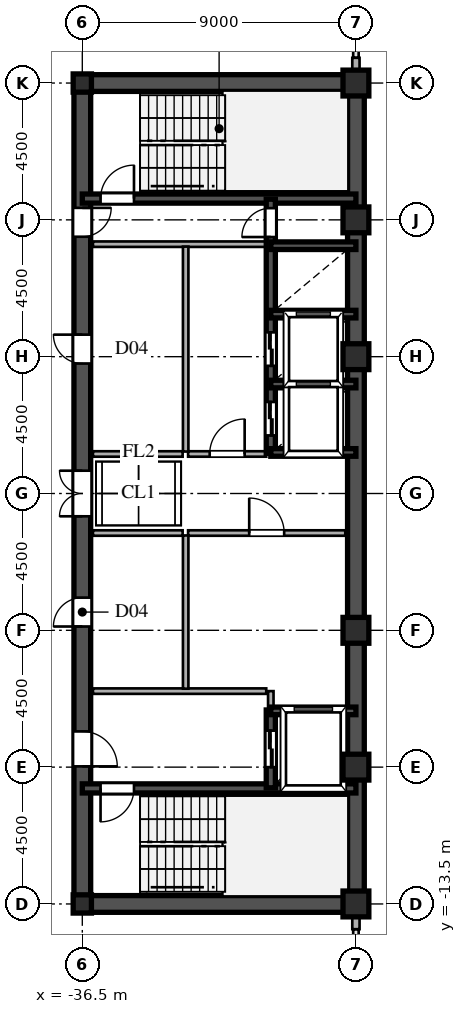
"""IFC4 building model, lengths in metres.
Left out: names, types, materials, properties, quantities, classifications, styles, units other than length and angle.
Written with IfcOpenShell. Run it as: python <this file> out.ifc"""

import sys

from ifc_helpers import new_model, si_unit, direction, frame, frame_2d, origin, origin_2d, place, context, subcontext, project, spatial, rectangle, hollow_rectangle, i_section, extrude, source, transform, mapped, element, fill, save


model = new_model("IFC4")
c1 = context("Model", 3, precision=1e-05, world=origin(), true_north=direction((0.0, 1.0)))
c2 = subcontext(c1, "Body", "Model", "MODEL_VIEW")
j1 = project(units=[si_unit("LENGTHUNIT", "METRE"), si_unit("PLANEANGLEUNIT", "RADIAN")], contexts=[c1])
p1 = place(None, origin())
s1 = spatial("IfcSite", under=j1, at=p1, CompositionType="ELEMENT")
p2 = place(p1, origin())
s2 = spatial("IfcBuilding", under=s1, at=p2, CompositionType="ELEMENT")
p3 = place(p2, frame((0.0, 0.0, 188.7)))
s3 = spatial("IfcBuildingStorey", under=s2, at=p3, CompositionType="ELEMENT", Elevation=188.7)
m1 = source(origin(), c2, "Body", "SweptSolid", [
    extrude(hollow_rectangle(XDim=0.85, YDim=0.85, WallThickness=0.036, at=origin_2d()), origin(), (0.0, 0.0, 1.0), 3.6),
])
for number, where, z_axis, x_axis in (
    (1, (-27.5, -13.5, 0.0), (0.0, 0.0, 1.0), (1.0, 0.0, 0.0)),
    (2, (-27.5, -9.0, 0.0), (0.0, 0.0, 1.0), (1.0, 0.0, 0.0)),
    (3, (-27.5, -4.5, 0.0), (0.0, 0.0, 1.0), (1.0, 0.0, 0.0)),
    (4, (-27.5, 4.5, 0.0), (0.0, 0.0, 1.0), (1.0, 0.0, 0.0)),
    (5, (-27.5, 9.0, 0.0), (0.0, 0.0, 1.0), (1.0, 0.0, 0.0)),
    (6, (-27.5, 13.5, 0.0), (0.0, 0.0, 1.0), (1.0, 0.0, 0.0)),
):
    element("IfcColumn", number, at=place(p3, frame(where, z_axis=z_axis, x_axis=x_axis)), inside=s3, PredefinedType="COLUMN", context=c2, shape_type="MappedRepresentation", body=[
        mapped(m1, transform((0.0, 0.0, 0.0), scale=1.0)),
    ])
m2 = source(origin(), c2, "Body", "SweptSolid", [
    extrude(i_section(OverallWidth=0.6, OverallDepth=0.6, WebThickness=0.025, FlangeThickness=0.04, at=origin_2d()), origin(), (0.0, 0.0, 1.0), 3.6),
])
for number, where, z_axis, x_axis in (
    (7, (-36.5, -13.5, 0.0), (0.0, 0.0, 1.0), (1.0, 0.0, 0.0)),
    (8, (-36.5, 13.5, 0.0), (0.0, 0.0, 1.0), (1.0, 0.0, 0.0)),
):
    element("IfcColumn", number, at=place(p3, frame(where, z_axis=z_axis, x_axis=x_axis)), inside=s3, PredefinedType="COLUMN", context=c2, shape_type="MappedRepresentation", body=[
        mapped(m2, transform((0.0, 0.0, 0.0), scale=1.0)),
    ])
for number, where, z_axis, x_axis in (
    (9, (-27.5, -14.33, 0.0), (0.0, 0.0, 1.0), (0.0, 1.0, 0.0)),
    (10, (-27.5, 13.78, 0.0), (0.0, 0.0, 1.0), (0.0, 1.0, 0.0)),
):
    element("IfcWall", number, at=place(p3, frame(where, z_axis=z_axis, x_axis=x_axis)), inside=s3, PredefinedType="SOLIDWALL", context=c2, shape_type="SweptSolid", body=[
        extrude(rectangle(XDim=0.55, YDim=0.24, at=frame_2d((0.275, 0.0))), origin(), (0.0, 0.0, 1.0), 2.88),
    ])
for number, where, z_axis, x_axis in (
    (11, (-27.5, -13.5, 0.0), (0.0, 0.0, 1.0), (0.0, 1.0, 0.0)),
    (12, (-27.5, 1.3, 0.0), (0.0, 0.0, 1.0), (0.0, 1.0, 0.0)),
):
    element("IfcWall", number, at=place(p3, frame(where, z_axis=z_axis, x_axis=x_axis)), inside=s3, PredefinedType="SHEAR", context=c2, shape_type="SweptSolid", body=[
        extrude(rectangle(XDim=12.2, YDim=0.55, at=frame_2d((6.1, 0.0))), origin(), (0.0, 0.0, 1.0), 3.38),
    ])
p4 = place(p3, frame((-27.5, -1.3, 0.0), z_axis=(0.0, 0.0, 1.0), x_axis=(0.0, 1.0, 0.0)))
e13 = element("IfcWall", 13, at=p4, inside=s3, PredefinedType="SHEAR", context=c2, shape_type="SweptSolid", body=[
    extrude(rectangle(XDim=2.6, YDim=0.55, at=frame_2d((1.3, 0.0))), origin(), (0.0, 0.0, 1.0), 3.38),
])
for number, where, z_axis, x_axis in (
    (14, (-36.5, -13.5, 0.0), (0.0, 0.0, 1.0), (1.0, 0.0, 0.0)),
    (15, (-36.5, 13.5, 0.0), (0.0, 0.0, 1.0), (1.0, 0.0, 0.0)),
):
    element("IfcWall", number, at=place(p3, frame(where, z_axis=z_axis, x_axis=x_axis)), inside=s3, PredefinedType="SHEAR", context=c2, shape_type="SweptSolid", body=[
        extrude(rectangle(XDim=9.0, YDim=0.55, at=frame_2d((4.5, 0.0))), origin(), (0.0, 0.0, 1.0), 3.38),
    ])
p5 = place(p3, frame((-36.5, -13.65, 0.0), z_axis=(0.0, 0.0, 1.0), x_axis=(0.0, 1.0, 0.0)))
e16 = element("IfcWall", 16, at=p5, inside=s3, PredefinedType="SHEAR", context=c2, shape_type="SweptSolid", body=[
    extrude(rectangle(XDim=7.15, YDim=0.55, at=frame_2d((3.575, 0.0))), origin(), (0.0, 0.0, 1.0), 3.38),
])
p6 = place(p5, frame((4.675, 0.0, 0.0)))
e17 = element("IfcOpeningElement", 17, at=p6, cuts=e16, PredefinedType="OPENING", context=c2, shape_type="SweptSolid", body=[
    extrude(rectangle(XDim=1.15, YDim=2.2, at=frame_2d((0.575, 1.1))), frame((0.0, 0.285, 0.0), z_axis=(0.0, -1.0, 0.0), x_axis=(1.0, 0.0, 0.0)), (0.0, 0.0, 1.0), 0.57),
])
p7 = place(p3, frame((-36.5, -1.3, 0.0), z_axis=(0.0, 0.0, 1.0), x_axis=(0.0, 1.0, 0.0)))
e18 = element("IfcWall", 18, at=p7, inside=s3, PredefinedType="SHEAR", context=c2, shape_type="SweptSolid", body=[
    extrude(rectangle(XDim=2.6, YDim=0.55, at=frame_2d((1.3, 0.0))), origin(), (0.0, 0.0, 1.0), 3.38),
])
p8 = place(p7, frame((0.55, 0.0, 0.0)))
e19 = element("IfcOpeningElement", 19, at=p8, cuts=e18, PredefinedType="OPENING", context=c2, shape_type="SweptSolid", body=[
    extrude(rectangle(XDim=1.5, YDim=2.3, at=frame_2d((0.75, 1.15))), frame((0.0, 0.285, 0.0), z_axis=(0.0, -1.0, 0.0), x_axis=(1.0, 0.0, 0.0)), (0.0, 0.0, 1.0), 0.57),
])
p9 = place(p3, frame((-36.5, 8.2, 0.0), z_axis=(0.0, 0.0, 1.0), x_axis=(0.0, 1.0, 0.0)))
e20 = element("IfcWall", 20, at=p9, inside=s3, PredefinedType="SHEAR", context=c2, shape_type="SweptSolid", body=[
    extrude(rectangle(XDim=5.45, YDim=0.55, at=frame_2d((2.725, 0.0))), origin(), (0.0, 0.0, 1.0), 3.38),
])
p10 = place(p9, frame((0.245, 0.0, 0.0)))
e21 = element("IfcOpeningElement", 21, at=p10, cuts=e20, PredefinedType="OPENING", context=c2, shape_type="SweptSolid", body=[
    extrude(rectangle(XDim=0.95, YDim=2.15, at=frame_2d((0.475, 1.075))), frame((0.0, 0.285, 0.0), z_axis=(0.0, -1.0, 0.0), x_axis=(1.0, 0.0, 0.0)), (0.0, 0.0, 1.0), 0.57),
])
p11 = place(p3, frame((-36.5, -6.5, 0.0), z_axis=(0.0, 0.0, 1.0), x_axis=(0.0, 1.0, 0.0)))
e22 = element("IfcWall", 22, at=p11, inside=s3, PredefinedType="SHEAR", context=c2, shape_type="SweptSolid", body=[
    extrude(rectangle(XDim=5.2, YDim=0.55, at=frame_2d((2.6, 0.0))), origin(), (0.0, 0.0, 1.0), 3.38),
])
p12 = place(p11, frame((2.125, 0.0, 0.0)))
e23 = element("IfcOpeningElement", 23, at=p12, cuts=e22, PredefinedType="OPENING", context=c2, shape_type="SweptSolid", body=[
    extrude(rectangle(XDim=0.95, YDim=2.15, at=frame_2d((0.475, 1.075))), frame((0.0, 0.285, 0.0), z_axis=(0.0, -1.0, 0.0), x_axis=(1.0, 0.0, 0.0)), (0.0, 0.0, 1.0), 0.57),
])
p13 = place(p3, frame((-36.5, 1.3, 0.0), z_axis=(0.0, 0.0, 1.0), x_axis=(0.0, 1.0, 0.0)))
e24 = element("IfcWall", 24, at=p13, inside=s3, PredefinedType="SHEAR", context=c2, shape_type="SweptSolid", body=[
    extrude(rectangle(XDim=6.9, YDim=0.55, at=frame_2d((3.45, 0.0))), origin(), (0.0, 0.0, 1.0), 3.38),
])
p14 = place(p13, frame((2.975, 0.0, 0.0)))
e25 = element("IfcOpeningElement", 25, at=p14, cuts=e24, PredefinedType="OPENING", context=c2, shape_type="SweptSolid", body=[
    extrude(rectangle(XDim=0.95, YDim=2.15, at=frame_2d((0.475, 1.075))), frame((0.0, 0.285, 0.0), z_axis=(0.0, -1.0, 0.0), x_axis=(1.0, 0.0, 0.0)), (0.0, 0.0, 1.0), 0.57),
])
p15 = place(p3, frame((-36.5, -9.7, 0.0), z_axis=(0.0, 0.0, 1.0), x_axis=(1.0, 0.0, 0.0)))
e26 = element("IfcWall", 26, at=p15, inside=s3, PredefinedType="SHEAR", context=c2, shape_type="SweptSolid", body=[
    extrude(rectangle(XDim=9.0, YDim=0.3, at=frame_2d((4.5, 0.0))), origin(), (0.0, 0.0, 1.0), 3.38),
])
p16 = place(p15, frame((0.6, 0.0, 0.0)))
e27 = element("IfcOpeningElement", 27, at=p16, cuts=e26, PredefinedType="OPENING", context=c2, shape_type="SweptSolid", body=[
    extrude(rectangle(XDim=1.1, YDim=2.2, at=frame_2d((0.55, 1.1))), frame((0.0, 0.16, 0.0), z_axis=(0.0, -1.0, 0.0), x_axis=(1.0, 0.0, 0.0)), (0.0, 0.0, 1.0), 0.32),
])
p17 = place(p3, frame((-36.5, 9.7, 0.0), z_axis=(0.0, 0.0, 1.0), x_axis=(1.0, 0.0, 0.0)))
e28 = element("IfcWall", 28, at=p17, inside=s3, PredefinedType="SHEAR", context=c2, shape_type="SweptSolid", body=[
    extrude(rectangle(XDim=9.0, YDim=0.3, at=frame_2d((4.5, 0.0))), origin(), (0.0, 0.0, 1.0), 3.38),
])
p18 = place(p17, frame((0.6, 0.0, 0.0)))
e29 = element("IfcOpeningElement", 29, at=p18, cuts=e28, PredefinedType="OPENING", context=c2, shape_type="SweptSolid", body=[
    extrude(rectangle(XDim=1.1, YDim=2.2, at=frame_2d((0.55, 1.1))), frame((0.0, 0.16, 0.0), z_axis=(0.0, -1.0, 0.0), x_axis=(1.0, 0.0, 0.0)), (0.0, 0.0, 1.0), 0.32),
])
for number, where, z_axis, x_axis in (
    (30, (-30.3, -7.15, 0.0), (0.0, 0.0, 1.0), (1.0, 0.0, 0.0)),
    (31, (-30.3, 1.35, 0.0), (0.0, 0.0, 1.0), (1.0, 0.0, 0.0)),
    (32, (-30.3, 3.6, 0.0), (0.0, 0.0, 1.0), (1.0, 0.0, 0.0)),
    (33, (-30.3, 5.9, 0.0), (0.0, 0.0, 1.0), (1.0, 0.0, 0.0)),
    (34, (-30.3, 8.15, 0.0), (0.0, 0.0, 1.0), (1.0, 0.0, 0.0)),
):
    element("IfcWall", number, at=place(p3, frame(where, z_axis=z_axis, x_axis=x_axis)), inside=s3, PredefinedType="SHEAR", context=c2, shape_type="SweptSolid", body=[
        extrude(rectangle(XDim=2.8, YDim=0.25, at=frame_2d((1.4, 0.0))), origin(), (0.0, 0.0, 1.0), 3.38),
    ])
p19 = place(p3, frame((-30.3, -9.68, 0.0), z_axis=(0.0, 0.0, 1.0), x_axis=(0.0, 1.0, 0.0)))
e35 = element("IfcWall", 35, at=p19, inside=s3, PredefinedType="SHEAR", context=c2, shape_type="SweptSolid", body=[
    extrude(rectangle(XDim=2.56, YDim=0.3, at=frame_2d((1.28, 0.0))), origin(), (0.0, 0.0, 1.0), 3.38),
])
p20 = place(p19, frame((0.68, 0.0, 0.0)))
e36 = element("IfcOpeningElement", 36, at=p20, cuts=e35, PredefinedType="OPENING", context=c2, shape_type="SweptSolid", body=[
    extrude(rectangle(XDim=1.2, YDim=2.25, at=frame_2d((0.6, 1.125))), frame((0.0, 0.16, 0.0), z_axis=(0.0, -1.0, 0.0), x_axis=(1.0, 0.0, 0.0)), (0.0, 0.0, 1.0), 0.32),
])
p21 = place(p3, frame((-30.3, 1.32, 0.0), z_axis=(0.0, 0.0, 1.0), x_axis=(0.0, 1.0, 0.0)))
e37 = element("IfcWall", 37, at=p21, inside=s3, PredefinedType="SHEAR", context=c2, shape_type="SweptSolid", body=[
    extrude(rectangle(XDim=2.28, YDim=0.3, at=frame_2d((1.14, 0.0))), origin(), (0.0, 0.0, 1.0), 3.38),
])
p22 = place(p21, frame((0.59, 0.0, 0.0)))
e38 = element("IfcOpeningElement", 38, at=p22, cuts=e37, PredefinedType="OPENING", context=c2, shape_type="SweptSolid", body=[
    extrude(rectangle(XDim=1.1, YDim=2.2, at=frame_2d((0.55, 1.1))), frame((0.0, 0.16, 0.0), z_axis=(0.0, -1.0, 0.0), x_axis=(1.0, 0.0, 0.0)), (0.0, 0.0, 1.0), 0.32),
])
p23 = place(p3, frame((-30.3, 3.6, 0.0), z_axis=(0.0, 0.0, 1.0), x_axis=(0.0, 1.0, 0.0)))
e39 = element("IfcWall", 39, at=p23, inside=s3, PredefinedType="SHEAR", context=c2, shape_type="SweptSolid", body=[
    extrude(rectangle(XDim=2.3, YDim=0.3, at=frame_2d((1.15, 0.0))), origin(), (0.0, 0.0, 1.0), 3.38),
])
p24 = place(p23, frame((0.6, 0.0, 0.0)))
e40 = element("IfcOpeningElement", 40, at=p24, cuts=e39, PredefinedType="OPENING", context=c2, shape_type="SweptSolid", body=[
    extrude(rectangle(XDim=1.1, YDim=2.2, at=frame_2d((0.55, 1.1))), frame((0.0, 0.16, 0.0), z_axis=(0.0, -1.0, 0.0), x_axis=(1.0, 0.0, 0.0)), (0.0, 0.0, 1.0), 0.32),
])
p25 = place(p3, frame((-30.3, 5.9, 0.0), z_axis=(0.0, 0.0, 1.0), x_axis=(0.0, 1.0, 0.0)))
e41 = element("IfcWall", 41, at=p25, inside=s3, PredefinedType="SHEAR", context=c2, shape_type="SweptSolid", body=[
    extrude(rectangle(XDim=2.25, YDim=0.3, at=frame_2d((1.125, 0.0))), origin(), (0.0, 0.0, 1.0), 3.38),
])
p26 = place(p3, frame((-30.3, 8.15, 0.0), z_axis=(0.0, 0.0, 1.0), x_axis=(0.0, 1.0, 0.0)))
e42 = element("IfcWall", 42, at=p26, inside=s3, PredefinedType="SHEAR", context=c2, shape_type="SweptSolid", body=[
    extrude(rectangle(XDim=1.53, YDim=0.3, at=frame_2d((0.765, 0.0))), origin(), (0.0, 0.0, 1.0), 3.38),
])
p27 = place(p26, frame((0.285, 0.0, 0.0)))
e43 = element("IfcOpeningElement", 43, at=p27, cuts=e42, PredefinedType="OPENING", context=c2, shape_type="SweptSolid", body=[
    extrude(rectangle(XDim=0.95, YDim=2.15, at=frame_2d((0.475, 1.075))), frame((0.0, 0.16, 0.0), z_axis=(0.0, -1.0, 0.0), x_axis=(1.0, 0.0, 0.0)), (0.0, 0.0, 1.0), 0.32),
])
p28 = place(p3, frame((-36.15, -6.5, 0.0), z_axis=(0.0, 0.0, 1.0), x_axis=(1.0, 0.0, 0.0)))
e44 = element("IfcWall", 44, at=p28, inside=s3, PredefinedType="PARTITIONING", context=c2, shape_type="SweptSolid", body=[
    extrude(rectangle(XDim=5.7, YDim=0.18, at=frame_2d((2.85, 0.0))), origin(), (0.0, 0.0, 1.0), 3.38),
])
p29 = place(p3, frame((-30.3, -7.12, 0.0), z_axis=(0.0, 0.0, 1.0), x_axis=(0.0, 1.0, 0.0)))
e45 = element("IfcWall", 45, at=p29, inside=s3, PredefinedType="PARTITIONING", context=c2, shape_type="SweptSolid", body=[
    extrude(rectangle(XDim=0.62, YDim=0.18, at=frame_2d((0.31, 0.0))), origin(), (0.0, 0.0, 1.0), 3.38),
])
p30 = place(p3, frame((-36.15, 8.2, 0.0), z_axis=(0.0, 0.0, 1.0), x_axis=(1.0, 0.0, 0.0)))
e46 = element("IfcWall", 46, at=p30, inside=s3, PredefinedType="PARTITIONING", context=c2, shape_type="SweptSolid", body=[
    extrude(rectangle(XDim=5.7, YDim=0.18, at=frame_2d((2.85, 0.0))), origin(), (0.0, 0.0, 1.0), 3.38),
])
p31 = place(p3, frame((-33.1, -6.42, 0.0), z_axis=(0.0, 0.0, 1.0), x_axis=(0.0, 1.0, 0.0)))
e47 = element("IfcWall", 47, at=p31, inside=s3, PredefinedType="PARTITIONING", context=c2, shape_type="SweptSolid", body=[
    extrude(rectangle(XDim=5.04, YDim=0.18, at=frame_2d((2.52, 0.0))), origin(), (0.0, 0.0, 1.0), 3.38),
])
p32 = place(p3, frame((-33.1, 1.38, 0.0), z_axis=(0.0, 0.0, 1.0), x_axis=(0.0, 1.0, 0.0)))
e48 = element("IfcWall", 48, at=p32, inside=s3, PredefinedType="PARTITIONING", context=c2, shape_type="SweptSolid", body=[
    extrude(rectangle(XDim=6.74, YDim=0.18, at=frame_2d((3.37, 0.0))), origin(), (0.0, 0.0, 1.0), 3.38),
])
p33 = place(p3, frame((-33.02, -1.3, 0.0), z_axis=(0.0, 0.0, 1.0), x_axis=(1.0, 0.0, 0.0)))
e49 = element("IfcWall", 49, at=p33, inside=s3, PredefinedType="PARTITIONING", context=c2, shape_type="SweptSolid", body=[
    extrude(rectangle(XDim=5.17, YDim=0.18, at=frame_2d((2.585, 0.0))), origin(), (0.0, 0.0, 1.0), 3.38),
])
p34 = place(p33, frame((2.01, 0.0, 0.0)))
e50 = element("IfcOpeningElement", 50, at=p34, cuts=e49, PredefinedType="OPENING", context=c2, shape_type="SweptSolid", body=[
    extrude(rectangle(XDim=1.15, YDim=2.2, at=frame_2d((0.575, 1.1))), frame((0.0, 0.1, 0.0), z_axis=(0.0, -1.0, 0.0), x_axis=(1.0, 0.0, 0.0)), (0.0, 0.0, 1.0), 0.2),
])
p35 = place(p3, frame((-33.02, 1.3, 0.0), z_axis=(0.0, 0.0, 1.0), x_axis=(1.0, 0.0, 0.0)))
e51 = element("IfcWall", 51, at=p35, inside=s3, PredefinedType="PARTITIONING", context=c2, shape_type="SweptSolid", body=[
    extrude(rectangle(XDim=2.57, YDim=0.18, at=frame_2d((1.285, 0.0))), origin(), (0.0, 0.0, 1.0), 3.38),
])
p36 = place(p35, frame((0.71, 0.0, 0.0)))
e52 = element("IfcOpeningElement", 52, at=p36, cuts=e51, PredefinedType="OPENING", context=c2, shape_type="SweptSolid", body=[
    extrude(rectangle(XDim=1.15, YDim=2.2, at=frame_2d((0.575, 1.1))), frame((0.0, 0.1, 0.0), z_axis=(0.0, -1.0, 0.0), x_axis=(1.0, 0.0, 0.0)), (0.0, 0.0, 1.0), 0.2),
])
for number, where, z_axis, x_axis in (
    (53, (-36.15, -1.3, 0.0), (0.0, 0.0, 1.0), (1.0, 0.0, 0.0)),
    (54, (-36.15, 1.3, 0.0), (0.0, 0.0, 1.0), (1.0, 0.0, 0.0)),
):
    element("IfcWall", number, at=place(p3, frame(where, z_axis=z_axis, x_axis=x_axis)), inside=s3, PredefinedType="PARTITIONING", context=c2, shape_type="SweptSolid", body=[
        extrude(rectangle(XDim=2.95, YDim=0.18, at=frame_2d((1.475, 0.0))), origin(), (0.0, 0.0, 1.0), 3.38),
    ])
m3 = source(origin(), c2, "Body", "SweptSolid", [
    extrude(rectangle(XDim=1.15, YDim=2.2, at=frame_2d((0.575, 1.1))), frame((0.0, 0.025, 0.0), z_axis=(0.0, -1.0, 0.0), x_axis=(1.0, 0.0, 0.0)), (0.0, 0.0, 1.0), 0.05),
])
p37 = place(p6, frame((1.15, 0.0, 0.0), z_axis=(0.0, 0.0, 1.0), x_axis=(-1.0, 0.0, 0.0)))
e55 = element("IfcDoor", 55, at=p37, inside=s3, OperationType="SINGLE_SWING_LEFT", PredefinedType="DOOR", context=c2, shape_type="MappedRepresentation", body=[
    mapped(m3, transform((0.0, 0.0, 0.0), scale=1.0)),
])
fill(e17, e55)
m4 = source(origin(), c2, "Body", "SweptSolid", [
    extrude(rectangle(XDim=1.5, YDim=2.3, at=frame_2d((0.75, 1.15))), frame((0.0, 0.025, 0.0), z_axis=(0.0, -1.0, 0.0), x_axis=(1.0, 0.0, 0.0)), (0.0, 0.0, 1.0), 0.05),
])
p38 = place(p8, origin())
e56 = element("IfcDoor", 56, at=p38, inside=s3, OperationType="DOUBLE_SWING_LEFT", PredefinedType="DOOR", context=c2, shape_type="MappedRepresentation", body=[
    mapped(m4, transform((0.0, 0.0, 0.0), scale=1.0)),
])
fill(e19, e56)
m5 = source(origin(), c2, "Body", "SweptSolid", [
    extrude(rectangle(XDim=0.95, YDim=2.15, at=frame_2d((0.475, 1.075))), frame((0.0, 0.025, 0.0), z_axis=(0.0, -1.0, 0.0), x_axis=(1.0, 0.0, 0.0)), (0.0, 0.0, 1.0), 0.05),
])
p39 = place(p10, frame((0.95, 0.0, 0.0), z_axis=(0.0, 0.0, 1.0), x_axis=(-1.0, 0.0, 0.0)))
e57 = element("IfcDoor", 57, at=p39, inside=s3, OperationType="SINGLE_SWING_RIGHT", PredefinedType="DOOR", context=c2, shape_type="MappedRepresentation", body=[
    mapped(m5, transform((0.0, 0.0, 0.0), scale=1.0)),
])
fill(e21, e57)
p40 = place(p12, origin())
e58 = element("IfcDoor", 58, at=p40, inside=s3, OperationType="SINGLE_SWING_LEFT", PredefinedType="DOOR", context=c2, shape_type="MappedRepresentation", body=[
    mapped(m5, transform((0.0, 0.0, 0.0), scale=1.0)),
])
fill(e23, e58)
p41 = place(p14, origin())
e59 = element("IfcDoor", 59, at=p41, inside=s3, OperationType="SINGLE_SWING_RIGHT", PredefinedType="DOOR", context=c2, shape_type="MappedRepresentation", body=[
    mapped(m5, transform((0.0, 0.0, 0.0), scale=1.0)),
])
fill(e25, e59)
m6 = source(origin(), c2, "Body", "SweptSolid", [
    extrude(rectangle(XDim=1.1, YDim=2.2, at=frame_2d((0.55, 1.1))), frame((0.0, 0.025, 0.0), z_axis=(0.0, -1.0, 0.0), x_axis=(1.0, 0.0, 0.0)), (0.0, 0.0, 1.0), 0.05),
])
p42 = place(p16, frame((1.1, 0.0, 0.0), z_axis=(0.0, 0.0, 1.0), x_axis=(-1.0, 0.0, 0.0)))
e60 = element("IfcDoor", 60, at=p42, inside=s3, OperationType="SINGLE_SWING_LEFT", PredefinedType="DOOR", context=c2, shape_type="MappedRepresentation", body=[
    mapped(m6, transform((0.0, 0.0, 0.0), scale=1.0)),
])
fill(e27, e60)
p43 = place(p18, origin())
e61 = element("IfcDoor", 61, at=p43, inside=s3, OperationType="SINGLE_SWING_RIGHT", PredefinedType="DOOR", context=c2, shape_type="MappedRepresentation", body=[
    mapped(m6, transform((0.0, 0.0, 0.0), scale=1.0)),
])
fill(e29, e61)
m7 = source(origin(), c2, "Body", "SweptSolid", [
    extrude(rectangle(XDim=1.2, YDim=2.25, at=frame_2d((0.6, 1.125))), frame((0.0, 0.025, 0.0), z_axis=(0.0, -1.0, 0.0), x_axis=(1.0, 0.0, 0.0)), (0.0, 0.0, 1.0), 0.05),
])
p44 = place(p20, origin())
e62 = element("IfcDoor", 62, at=p44, inside=s3, OperationType="DOUBLE_DOOR_SLIDING", PredefinedType="DOOR", context=c2, shape_type="MappedRepresentation", body=[
    mapped(m7, transform((0.0, 0.0, 0.0), scale=1.0)),
])
fill(e36, e62)
m8 = source(origin(), c2, "Body", "SweptSolid", [
    extrude(rectangle(XDim=1.1, YDim=2.2, at=frame_2d((0.55, 1.1))), frame((0.0, 0.025, 0.0), z_axis=(0.0, -1.0, 0.0), x_axis=(1.0, 0.0, 0.0)), (0.0, 0.0, 1.0), 0.05),
])
p45 = place(p22, origin())
e63 = element("IfcDoor", 63, at=p45, inside=s3, OperationType="DOUBLE_DOOR_SLIDING", PredefinedType="DOOR", context=c2, shape_type="MappedRepresentation", body=[
    mapped(m8, transform((0.0, 0.0, 0.0), scale=1.0)),
])
fill(e38, e63)
p46 = place(p24, origin())
e64 = element("IfcDoor", 64, at=p46, inside=s3, OperationType="DOUBLE_DOOR_SLIDING", PredefinedType="DOOR", context=c2, shape_type="MappedRepresentation", body=[
    mapped(m8, transform((0.0, 0.0, 0.0), scale=1.0)),
])
fill(e40, e64)
p47 = place(p27, origin())
e65 = element("IfcDoor", 65, at=p47, inside=s3, OperationType="SINGLE_SWING_LEFT", PredefinedType="DOOR", context=c2, shape_type="MappedRepresentation", body=[
    mapped(m5, transform((0.0, 0.0, 0.0), scale=1.0)),
])
fill(e43, e65)
p48 = place(p34, origin())
e66 = element("IfcDoor", 66, at=p48, inside=s3, OperationType="SINGLE_SWING_LEFT", PredefinedType="DOOR", context=c2, shape_type="MappedRepresentation", body=[
    mapped(m3, transform((0.0, 0.0, 0.0), scale=1.0)),
])
fill(e50, e66)
p49 = place(p36, origin())
e67 = element("IfcDoor", 67, at=p49, inside=s3, OperationType="SINGLE_SWING_RIGHT", PredefinedType="DOOR", context=c2, shape_type="MappedRepresentation", body=[
    mapped(m3, transform((0.0, 0.0, 0.0), scale=1.0)),
])
fill(e52, e67)
save(model, sys.argv[1])
